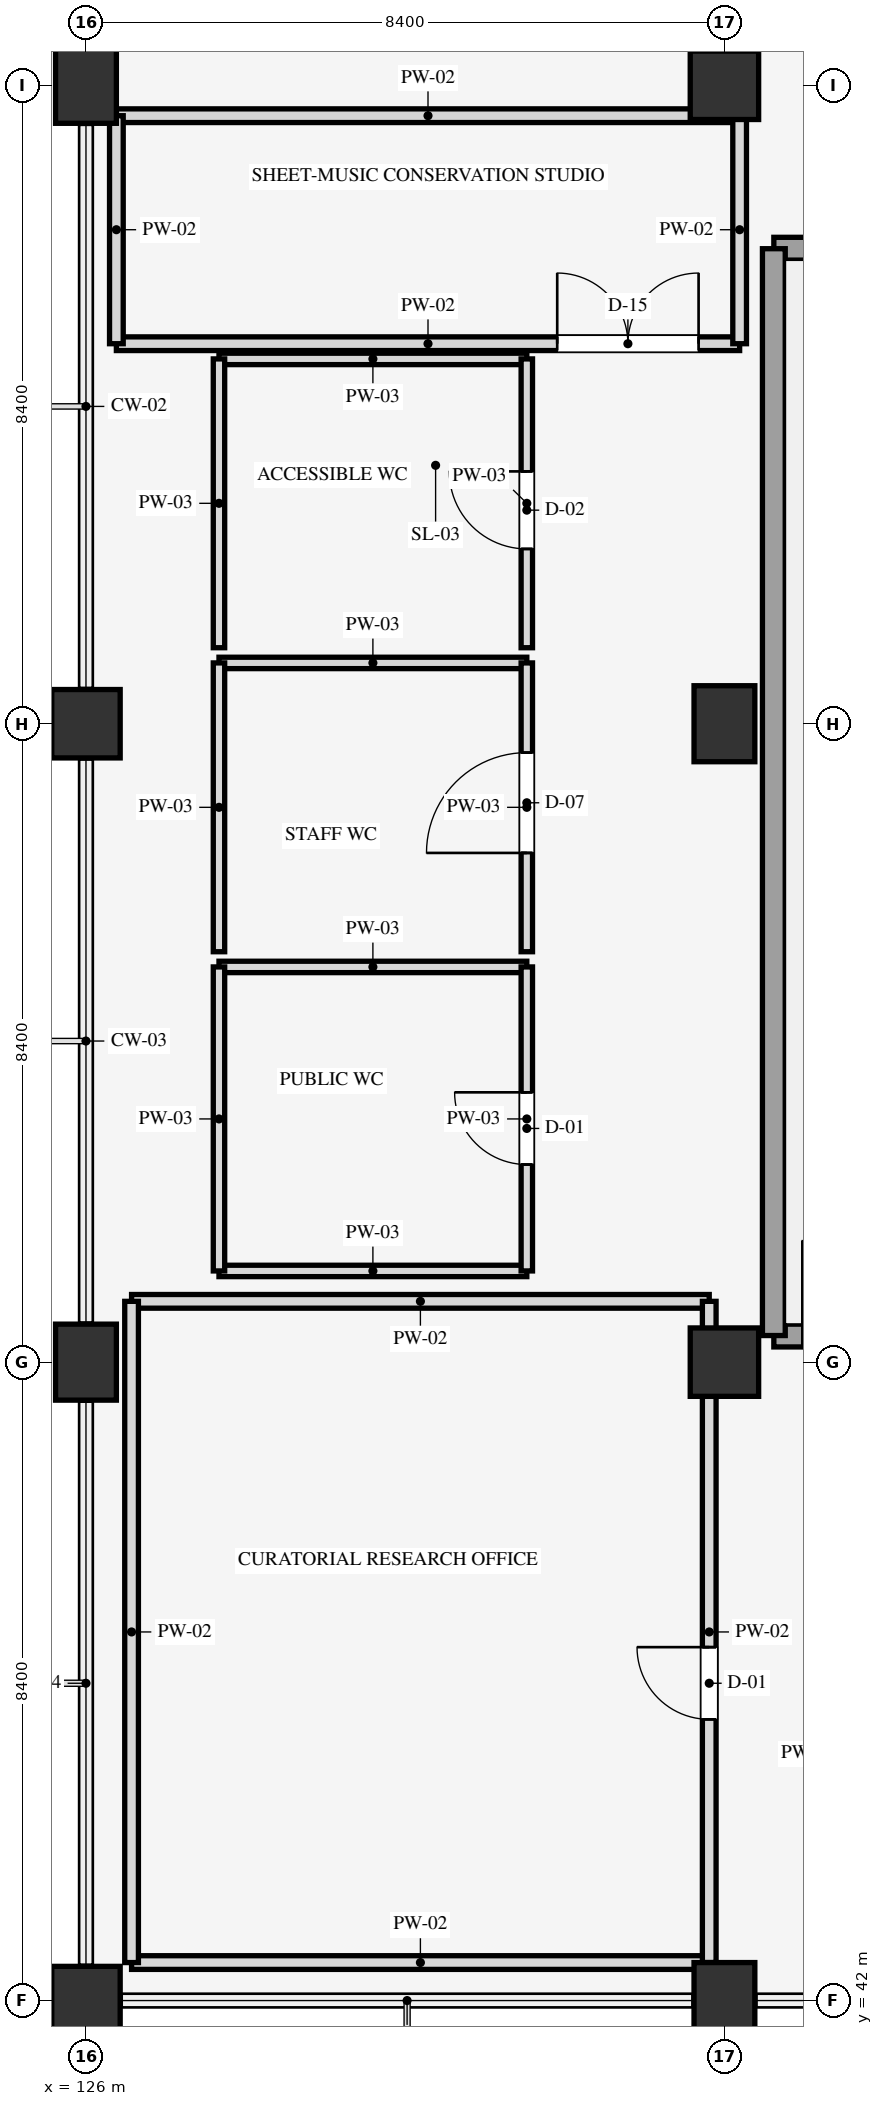
"""IFC4 building model, lengths in metres.
Left out: names, types, materials, properties, quantities, classifications, styles, units other than length and angle.
Written with IfcOpenShell. Run it as: python <this file> out.ifc"""

import sys

from ifc_helpers import new_model, si_unit, direction, frame, frame_2d, origin, origin_2d, place, context, subcontext, project, spatial, rectangle, extrude, element, fill, save


model = new_model("IFC4")
c1 = context("Model", 3, precision=1e-05, world=origin(), true_north=direction((0.0, 1.0)))
c2 = subcontext(c1, "Body", "Model", "MODEL_VIEW")
j1 = project(units=[si_unit("LENGTHUNIT", "METRE"), si_unit("PLANEANGLEUNIT", "RADIAN")], contexts=[c1])
p1 = place(None, origin())
s1 = spatial("IfcSite", under=j1, at=p1, CompositionType="ELEMENT")
p2 = place(p1, origin())
s2 = spatial("IfcBuilding", under=s1, at=p2, CompositionType="ELEMENT")
p3 = place(p2, frame((0.0, 0.0, 61.5)))
s3 = spatial("IfcBuildingStorey", under=s2, at=p3, CompositionType="ELEMENT", Elevation=61.5)
p4 = place(p3, frame((126.0, 42.0, 0.0), z_axis=(0.0, 0.0, 1.0), x_axis=(1.0, 0.0, 0.0)))
e1 = element("IfcColumn", 1, at=p4, inside=s3, PredefinedType="COLUMN", context=c2, shape_type="SweptSolid", body=[
    extrude(rectangle(XDim=0.9, YDim=0.9, at=origin_2d()), origin(), (0.0, 0.0, 1.0), 4.2),
])
p5 = place(p3, frame((126.0, 50.4, 0.0), z_axis=(0.0, 0.0, 1.0), x_axis=(1.0, 0.0, 0.0)))
e2 = element("IfcColumn", 2, at=p5, inside=s3, PredefinedType="COLUMN", context=c2, shape_type="SweptSolid", body=[
    extrude(rectangle(XDim=0.8, YDim=1.0, at=origin_2d()), origin(), (0.0, 0.0, 1.0), 4.2),
])
p6 = place(p3, frame((126.0, 58.8, 0.0), z_axis=(0.0, 0.0, 1.0), x_axis=(1.0, 0.0, 0.0)))
e3 = element("IfcColumn", 3, at=p6, inside=s3, PredefinedType="COLUMN", context=c2, shape_type="SweptSolid", body=[
    extrude(rectangle(XDim=0.9, YDim=0.9, at=origin_2d()), origin(), (0.0, 0.0, 1.0), 4.2),
])
for number, where, z_axis, x_axis in (
    (4, (126.0, 67.2, 0.0), (0.0, 0.0, 1.0), (1.0, 0.0, 0.0)),
    (5, (134.4, 42.0, 0.0), (0.0, 0.0, 1.0), (1.0, 0.0, 0.0)),
):
    element("IfcColumn", number, at=place(p3, frame(where, z_axis=z_axis, x_axis=x_axis)), inside=s3, PredefinedType="COLUMN", context=c2, shape_type="SweptSolid", body=[
        extrude(rectangle(XDim=0.8, YDim=1.0, at=origin_2d()), origin(), (0.0, 0.0, 1.0), 4.2),
    ])
p7 = place(p3, frame((134.4, 50.4, 0.0), z_axis=(0.0, 0.0, 1.0), x_axis=(1.0, 0.0, 0.0)))
e6 = element("IfcColumn", 6, at=p7, inside=s3, PredefinedType="COLUMN", context=c2, shape_type="SweptSolid", body=[
    extrude(rectangle(XDim=0.9, YDim=0.9, at=origin_2d()), origin(), (0.0, 0.0, 1.0), 4.2),
])
p8 = place(p3, frame((134.4, 58.8, 0.0), z_axis=(0.0, 0.0, 1.0), x_axis=(1.0, 0.0, 0.0)))
e7 = element("IfcColumn", 7, at=p8, inside=s3, PredefinedType="COLUMN", context=c2, shape_type="SweptSolid", body=[
    extrude(rectangle(XDim=0.8, YDim=1.0, at=origin_2d()), origin(), (0.0, 0.0, 1.0), 4.2),
])
p9 = place(p3, frame((134.4, 67.2, 0.0), z_axis=(0.0, 0.0, 1.0), x_axis=(1.0, 0.0, 0.0)))
e8 = element("IfcColumn", 8, at=p9, inside=s3, PredefinedType="COLUMN", context=c2, shape_type="SweptSolid", body=[
    extrude(rectangle(XDim=0.9, YDim=0.9, at=origin_2d()), origin(), (0.0, 0.0, 1.0), 4.2),
])
p10 = place(p3, frame((135.05, 50.75, 0.0), z_axis=(0.0, 0.0, 1.0), x_axis=(1.0, 0.0, 0.0)))
e9 = element("IfcWall", 9, at=p10, inside=s3, PredefinedType="SHEAR", context=c2, shape_type="SweptSolid", body=[
    extrude(rectangle(XDim=4.0, YDim=0.3, at=frame_2d((2.0, 0.0))), origin(), (0.0, 0.0, 1.0), 4.2),
])
p11 = place(p10, frame((0.375, 0.0, 0.0)))
e10 = element("IfcOpeningElement", 10, at=p11, cuts=e9, PredefinedType="OPENING", context=c2, shape_type="SweptSolid", body=[
    extrude(rectangle(XDim=1.25, YDim=2.15, at=frame_2d((0.625, 1.075))), frame((0.0, 0.16, 0.0), z_axis=(0.0, -1.0, 0.0), x_axis=(1.0, 0.0, 0.0)), (0.0, 0.0, 1.0), 0.32),
])
p12 = place(p3, frame((135.05, 65.05, 0.0), z_axis=(0.0, 0.0, 1.0), x_axis=(1.0, 0.0, 0.0)))
e11 = element("IfcWall", 11, at=p12, inside=s3, PredefinedType="SHEAR", context=c2, shape_type="SweptSolid", body=[
    extrude(rectangle(XDim=4.0, YDim=0.3, at=frame_2d((2.0, 0.0))), origin(), (0.0, 0.0, 1.0), 4.2),
])
p13 = place(p3, frame((135.05, 50.75, 0.0), z_axis=(0.0, 0.0, 1.0), x_axis=(0.0, 1.0, 0.0)))
e12 = element("IfcWall", 12, at=p13, inside=s3, PredefinedType="SHEAR", context=c2, shape_type="SweptSolid", body=[
    extrude(rectangle(XDim=14.3, YDim=0.3, at=frame_2d((7.15, 0.0))), origin(), (0.0, 0.0, 1.0), 4.2),
])
for number, where, z_axis, x_axis in (
    (13, (127.75, 51.6, 0.0), (0.0, 0.0, 1.0), (1.0, 0.0, 0.0)),
    (14, (127.75, 55.6, 0.0), (0.0, 0.0, 1.0), (1.0, 0.0, 0.0)),
):
    element("IfcWall", number, at=place(p3, frame(where, z_axis=z_axis, x_axis=x_axis)), inside=s3, PredefinedType="PARTITIONING", context=c2, shape_type="SweptSolid", body=[
        extrude(rectangle(XDim=4.05, YDim=0.15, at=frame_2d((2.025, 0.0))), origin(), (0.0, 0.0, 1.0), 3.24),
    ])
p14 = place(p3, frame((127.75, 51.6, 0.0), z_axis=(0.0, 0.0, 1.0), x_axis=(0.0, 1.0, 0.0)))
e15 = element("IfcWall", 15, at=p14, inside=s3, PredefinedType="PARTITIONING", context=c2, shape_type="SweptSolid", body=[
    extrude(rectangle(XDim=4.0, YDim=0.15, at=frame_2d((2.0, 0.0))), origin(), (0.0, 0.0, 1.0), 3.24),
])
p15 = place(p3, frame((131.8, 51.6, 0.0), z_axis=(0.0, 0.0, 1.0), x_axis=(0.0, 1.0, 0.0)))
e16 = element("IfcWall", 16, at=p15, inside=s3, PredefinedType="PARTITIONING", context=c2, shape_type="SweptSolid", body=[
    extrude(rectangle(XDim=4.0, YDim=0.15, at=frame_2d((2.0, 0.0))), origin(), (0.0, 0.0, 1.0), 3.24),
])
p16 = place(p15, frame((1.4, 0.0, 0.0)))
e17 = element("IfcOpeningElement", 17, at=p16, cuts=e16, PredefinedType="OPENING", context=c2, shape_type="SweptSolid", body=[
    extrude(rectangle(XDim=0.95, YDim=2.1, at=frame_2d((0.475, 1.05))), frame((0.0, 0.085, 0.0), z_axis=(0.0, -1.0, 0.0), x_axis=(1.0, 0.0, 0.0)), (0.0, 0.0, 1.0), 0.17),
])
p17 = place(p3, frame((127.75, 59.6, 0.0), z_axis=(0.0, 0.0, 1.0), x_axis=(1.0, 0.0, 0.0)))
e18 = element("IfcWall", 18, at=p17, inside=s3, PredefinedType="PARTITIONING", context=c2, shape_type="SweptSolid", body=[
    extrude(rectangle(XDim=4.05, YDim=0.15, at=frame_2d((2.025, 0.0))), origin(), (0.0, 0.0, 1.0), 3.24),
])
p18 = place(p3, frame((127.75, 55.8, 0.0), z_axis=(0.0, 0.0, 1.0), x_axis=(0.0, 1.0, 0.0)))
e19 = element("IfcWall", 19, at=p18, inside=s3, PredefinedType="PARTITIONING", context=c2, shape_type="SweptSolid", body=[
    extrude(rectangle(XDim=3.8, YDim=0.15, at=frame_2d((1.9, 0.0))), origin(), (0.0, 0.0, 1.0), 3.24),
])
p19 = place(p3, frame((131.8, 55.8, 0.0), z_axis=(0.0, 0.0, 1.0), x_axis=(0.0, 1.0, 0.0)))
e20 = element("IfcWall", 20, at=p19, inside=s3, PredefinedType="PARTITIONING", context=c2, shape_type="SweptSolid", body=[
    extrude(rectangle(XDim=3.8, YDim=0.15, at=frame_2d((1.9, 0.0))), origin(), (0.0, 0.0, 1.0), 3.24),
])
p20 = place(p19, frame((1.3, 0.0, 0.0)))
e21 = element("IfcOpeningElement", 21, at=p20, cuts=e20, PredefinedType="OPENING", context=c2, shape_type="SweptSolid", body=[
    extrude(rectangle(XDim=1.32, YDim=2.18, at=frame_2d((0.66, 1.09))), frame((0.0, 0.085, 0.0), z_axis=(0.0, -1.0, 0.0), x_axis=(1.0, 0.0, 0.0)), (0.0, 0.0, 1.0), 0.17),
])
p21 = place(p3, frame((127.75, 63.6, 0.0), z_axis=(0.0, 0.0, 1.0), x_axis=(1.0, 0.0, 0.0)))
e22 = element("IfcWall", 22, at=p21, inside=s3, PredefinedType="PARTITIONING", context=c2, shape_type="SweptSolid", body=[
    extrude(rectangle(XDim=4.05, YDim=0.15, at=frame_2d((2.025, 0.0))), origin(), (0.0, 0.0, 1.0), 3.24),
])
p22 = place(p3, frame((127.75, 59.8, 0.0), z_axis=(0.0, 0.0, 1.0), x_axis=(0.0, 1.0, 0.0)))
e23 = element("IfcWall", 23, at=p22, inside=s3, PredefinedType="PARTITIONING", context=c2, shape_type="SweptSolid", body=[
    extrude(rectangle(XDim=3.8, YDim=0.15, at=frame_2d((1.9, 0.0))), origin(), (0.0, 0.0, 1.0), 3.24),
])
p23 = place(p3, frame((131.8, 59.8, 0.0), z_axis=(0.0, 0.0, 1.0), x_axis=(0.0, 1.0, 0.0)))
e24 = element("IfcWall", 24, at=p23, inside=s3, PredefinedType="PARTITIONING", context=c2, shape_type="SweptSolid", body=[
    extrude(rectangle(XDim=3.8, YDim=0.15, at=frame_2d((1.9, 0.0))), origin(), (0.0, 0.0, 1.0), 3.24),
])
p24 = place(p23, frame((1.3, 0.0, 0.0)))
e25 = element("IfcOpeningElement", 25, at=p24, cuts=e24, PredefinedType="OPENING", context=c2, shape_type="SweptSolid", body=[
    extrude(rectangle(XDim=1.02, YDim=2.1, at=frame_2d((0.51, 1.05))), frame((0.0, 0.085, 0.0), z_axis=(0.0, -1.0, 0.0), x_axis=(1.0, 0.0, 0.0)), (0.0, 0.0, 1.0), 0.17),
])
for number, where, z_axis, x_axis in (
    (26, (126.6, 42.5, 0.0), (0.0, 0.0, 1.0), (1.0, 0.0, 0.0)),
    (27, (126.6, 51.2, 0.0), (0.0, 0.0, 1.0), (1.0, 0.0, 0.0)),
):
    element("IfcWall", number, at=place(p3, frame(where, z_axis=z_axis, x_axis=x_axis)), inside=s3, PredefinedType="PARTITIONING", context=c2, shape_type="SweptSolid", body=[
        extrude(rectangle(XDim=7.6, YDim=0.18, at=frame_2d((3.8, 0.0))), origin(), (0.0, 0.0, 1.0), 3.24),
    ])
p25 = place(p3, frame((126.6, 42.5, 0.0), z_axis=(0.0, 0.0, 1.0), x_axis=(0.0, 1.0, 0.0)))
e28 = element("IfcWall", 28, at=p25, inside=s3, PredefinedType="PARTITIONING", context=c2, shape_type="SweptSolid", body=[
    extrude(rectangle(XDim=8.7, YDim=0.18, at=frame_2d((4.35, 0.0))), origin(), (0.0, 0.0, 1.0), 3.24),
])
p26 = place(p3, frame((134.2, 42.5, 0.0), z_axis=(0.0, 0.0, 1.0), x_axis=(0.0, 1.0, 0.0)))
e29 = element("IfcWall", 29, at=p26, inside=s3, PredefinedType="PARTITIONING", context=c2, shape_type="SweptSolid", body=[
    extrude(rectangle(XDim=8.7, YDim=0.18, at=frame_2d((4.35, 0.0))), origin(), (0.0, 0.0, 1.0), 3.24),
])
p27 = place(p26, frame((3.2, 0.0, 0.0)))
e30 = element("IfcOpeningElement", 30, at=p27, cuts=e29, PredefinedType="OPENING", context=c2, shape_type="SweptSolid", body=[
    extrude(rectangle(XDim=0.95, YDim=2.1, at=frame_2d((0.475, 1.05))), frame((0.0, 0.1, 0.0), z_axis=(0.0, -1.0, 0.0), x_axis=(1.0, 0.0, 0.0)), (0.0, 0.0, 1.0), 0.2),
])
p28 = place(p3, frame((126.4, 63.8, 0.0), z_axis=(0.0, 0.0, 1.0), x_axis=(1.0, 0.0, 0.0)))
e31 = element("IfcWall", 31, at=p28, inside=s3, PredefinedType="PARTITIONING", context=c2, shape_type="SweptSolid", body=[
    extrude(rectangle(XDim=8.2, YDim=0.18, at=frame_2d((4.1, 0.0))), origin(), (0.0, 0.0, 1.0), 3.24),
])
p29 = place(p28, frame((5.8, 0.0, 0.0)))
e32 = element("IfcOpeningElement", 32, at=p29, cuts=e31, PredefinedType="OPENING", context=c2, shape_type="SweptSolid", body=[
    extrude(rectangle(XDim=1.86, YDim=2.26, at=frame_2d((0.93, 1.13))), frame((0.0, 0.1, 0.0), z_axis=(0.0, -1.0, 0.0), x_axis=(1.0, 0.0, 0.0)), (0.0, 0.0, 1.0), 0.2),
])
p30 = place(p3, frame((126.4, 66.8, 0.0), z_axis=(0.0, 0.0, 1.0), x_axis=(1.0, 0.0, 0.0)))
e33 = element("IfcWall", 33, at=p30, inside=s3, PredefinedType="PARTITIONING", context=c2, shape_type="SweptSolid", body=[
    extrude(rectangle(XDim=8.2, YDim=0.18, at=frame_2d((4.1, 0.0))), origin(), (0.0, 0.0, 1.0), 3.24),
])
for number, where, z_axis, x_axis in (
    (34, (126.4, 63.8, 0.0), (0.0, 0.0, 1.0), (0.0, 1.0, 0.0)),
    (35, (134.6, 63.8, 0.0), (0.0, 0.0, 1.0), (0.0, 1.0, 0.0)),
):
    element("IfcWall", number, at=place(p3, frame(where, z_axis=z_axis, x_axis=x_axis)), inside=s3, PredefinedType="PARTITIONING", context=c2, shape_type="SweptSolid", body=[
        extrude(rectangle(XDim=3.0, YDim=0.18, at=frame_2d((1.5, 0.0))), origin(), (0.0, 0.0, 1.0), 3.24),
    ])
p31 = place(p11, origin())
e36 = element("IfcDoor", 36, at=p31, inside=s3, OperationType="SINGLE_SWING_LEFT", PredefinedType="DOOR", context=c2, shape_type="SweptSolid", body=[
    extrude(rectangle(XDim=1.25, YDim=2.15, at=frame_2d((0.625, 1.075))), frame((0.0, 0.025, 0.0), z_axis=(0.0, -1.0, 0.0), x_axis=(1.0, 0.0, 0.0)), (0.0, 0.0, 1.0), 0.05),
])
fill(e10, e36)
p32 = place(p16, origin())
e37 = element("IfcDoor", 37, at=p32, inside=s3, OperationType="SINGLE_SWING_RIGHT", PredefinedType="DOOR", context=c2, shape_type="SweptSolid", body=[
    extrude(rectangle(XDim=0.95, YDim=2.1, at=frame_2d((0.475, 1.05))), frame((0.0, 0.025, 0.0), z_axis=(0.0, -1.0, 0.0), x_axis=(1.0, 0.0, 0.0)), (0.0, 0.0, 1.0), 0.05),
])
fill(e17, e37)
p33 = place(p20, origin())
e38 = element("IfcDoor", 38, at=p33, inside=s3, OperationType="SINGLE_SWING_LEFT", PredefinedType="DOOR", context=c2, shape_type="SweptSolid", body=[
    extrude(rectangle(XDim=1.32, YDim=2.18, at=frame_2d((0.66, 1.09))), frame((0.0, 0.025, 0.0), z_axis=(0.0, -1.0, 0.0), x_axis=(1.0, 0.0, 0.0)), (0.0, 0.0, 1.0), 0.05),
])
fill(e21, e38)
p34 = place(p24, origin())
e39 = element("IfcDoor", 39, at=p34, inside=s3, OperationType="SINGLE_SWING_RIGHT", PredefinedType="DOOR", context=c2, shape_type="SweptSolid", body=[
    extrude(rectangle(XDim=1.02, YDim=2.1, at=frame_2d((0.51, 1.05))), frame((0.0, 0.025, 0.0), z_axis=(0.0, -1.0, 0.0), x_axis=(1.0, 0.0, 0.0)), (0.0, 0.0, 1.0), 0.05),
])
fill(e25, e39)
p35 = place(p27, origin())
e40 = element("IfcDoor", 40, at=p35, inside=s3, OperationType="SINGLE_SWING_RIGHT", PredefinedType="DOOR", context=c2, shape_type="SweptSolid", body=[
    extrude(rectangle(XDim=0.95, YDim=2.1, at=frame_2d((0.475, 1.05))), frame((0.0, 0.025, 0.0), z_axis=(0.0, -1.0, 0.0), x_axis=(1.0, 0.0, 0.0)), (0.0, 0.0, 1.0), 0.05),
])
fill(e30, e40)
p36 = place(p29, origin())
e41 = element("IfcDoor", 41, at=p36, inside=s3, OperationType="DOUBLE_DOOR_SINGLE_SWING", PredefinedType="DOOR", context=c2, shape_type="SweptSolid", body=[
    extrude(rectangle(XDim=1.86, YDim=2.26, at=frame_2d((0.93, 1.13))), frame((0.0, 0.025, 0.0), z_axis=(0.0, -1.0, 0.0), x_axis=(1.0, 0.0, 0.0)), (0.0, 0.0, 1.0), 0.05),
])
fill(e32, e41)
save(model, sys.argv[1])
